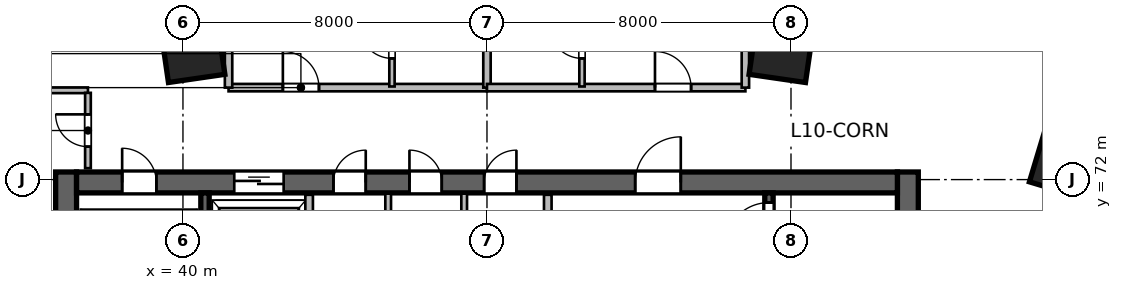
"""IFC4 building model, lengths in metres.
Left out: names, types, materials, properties, quantities, classifications, styles, units other than length and angle.
Written with IfcOpenShell. Run it as: python <this file> out.ifc"""

import sys

from ifc_helpers import new_model, si_unit, direction, frame, frame_2d, origin, origin_2d, place, context, subcontext, project, spatial, rectangle, extrude, source, transform, mapped, element, fill, save


model = new_model("IFC4")
c1 = context("Model", 3, precision=1e-05, world=origin(), true_north=direction((0.0, 1.0)))
c2 = subcontext(c1, "Body", "Model", "MODEL_VIEW")
j1 = project(units=[si_unit("LENGTHUNIT", "METRE"), si_unit("PLANEANGLEUNIT", "RADIAN")], contexts=[c1])
p1 = place(None, origin())
s1 = spatial("IfcSite", under=j1, at=p1, CompositionType="ELEMENT")
p2 = place(p1, origin())
s2 = spatial("IfcBuilding", under=s1, at=p2, CompositionType="ELEMENT")
p3 = place(p2, frame((0.0, 0.0, 49.8)))
s3 = spatial("IfcBuildingStorey", under=s2, at=p3, CompositionType="ELEMENT", Elevation=49.8)
m1 = source(origin(), c2, "Body", "SweptSolid", [
    extrude(rectangle(XDim=12.0, YDim=0.55, at=frame_2d((6.0, 0.0))), origin(), (0.0, 0.0, 1.0), 3.6),
])
for number, where, z_axis, x_axis in (
    (1, (36.925, 60.2, 0.0), (0.0, 0.0, 1.0), (0.0, 1.0, 0.0)),
    (2, (59.075, 60.2, 0.0), (0.0, 0.0, 1.0), (0.0, 1.0, 0.0)),
):
    element("IfcWall", number, at=place(p3, frame(where, z_axis=z_axis, x_axis=x_axis)), inside=s3, PredefinedType="SHEAR", context=c2, shape_type="MappedRepresentation", body=[
        mapped(m1, transform((0.0, 0.0, 0.0), scale=1.0)),
    ])
m2 = source(origin(), c2, "Body", "SweptSolid", [
    extrude(rectangle(XDim=21.6, YDim=0.55, at=frame_2d((10.8, 0.0))), origin(), (0.0, 0.0, 1.0), 3.6),
])
p4 = place(p3, frame((37.2, 71.925, 0.0), z_axis=(0.0, 0.0, 1.0), x_axis=(1.0, 0.0, 0.0)))
e3 = element("IfcWall", 3, at=p4, inside=s3, PredefinedType="SHEAR", context=c2, shape_type="MappedRepresentation", body=[
    mapped(m2, transform((0.0, 0.0, 0.0), scale=1.0)),
])
p5 = place(p4, frame((1.2, 0.0, 0.0)))
e4 = element("IfcOpeningElement", 4, at=p5, cuts=e3, PredefinedType="OPENING", context=c2, shape_type="SweptSolid", body=[
    extrude(rectangle(XDim=0.9, YDim=2.1, at=frame_2d((0.45, 1.05))), frame((0.0, 0.285, 0.0), z_axis=(0.0, -1.0, 0.0), x_axis=(1.0, 0.0, 0.0)), (0.0, 0.0, 1.0), 0.57),
])
p6 = place(p4, frame((14.7, 0.0, 0.0)))
e5 = element("IfcOpeningElement", 5, at=p6, cuts=e3, PredefinedType="OPENING", context=c2, shape_type="SweptSolid", body=[
    extrude(rectangle(XDim=1.2, YDim=2.15, at=frame_2d((0.6, 1.075))), frame((0.0, 0.285, 0.0), z_axis=(0.0, -1.0, 0.0), x_axis=(1.0, 0.0, 0.0)), (0.0, 0.0, 1.0), 0.57),
])
p7 = place(p4, frame((4.15, 0.0, 0.0)))
e6 = element("IfcOpeningElement", 6, at=p7, cuts=e3, PredefinedType="OPENING", context=c2, shape_type="SweptSolid", body=[
    extrude(rectangle(XDim=1.3, YDim=2.15, at=frame_2d((0.65, 1.075))), frame((0.0, 0.285, 0.0), z_axis=(0.0, -1.0, 0.0), x_axis=(1.0, 0.0, 0.0)), (0.0, 0.0, 1.0), 0.57),
])
p8 = place(p4, frame((6.76, 0.0, 0.0)))
e7 = element("IfcOpeningElement", 7, at=p8, cuts=e3, PredefinedType="OPENING", context=c2, shape_type="SweptSolid", body=[
    extrude(rectangle(XDim=0.85, YDim=2.1, at=frame_2d((0.425, 1.05))), frame((0.0, 0.285, 0.0), z_axis=(0.0, -1.0, 0.0), x_axis=(1.0, 0.0, 0.0)), (0.0, 0.0, 1.0), 0.57),
])
p9 = place(p4, frame((8.76, 0.0, 0.0)))
e8 = element("IfcOpeningElement", 8, at=p9, cuts=e3, PredefinedType="OPENING", context=c2, shape_type="SweptSolid", body=[
    extrude(rectangle(XDim=0.85, YDim=2.1, at=frame_2d((0.425, 1.05))), frame((0.0, 0.285, 0.0), z_axis=(0.0, -1.0, 0.0), x_axis=(1.0, 0.0, 0.0)), (0.0, 0.0, 1.0), 0.57),
])
p10 = place(p4, frame((10.725, 0.0, 0.0)))
e9 = element("IfcOpeningElement", 9, at=p10, cuts=e3, PredefinedType="OPENING", context=c2, shape_type="SweptSolid", body=[
    extrude(rectangle(XDim=0.85, YDim=2.1, at=frame_2d((0.425, 1.05))), frame((0.0, 0.285, 0.0), z_axis=(0.0, -1.0, 0.0), x_axis=(1.0, 0.0, 0.0)), (0.0, 0.0, 1.0), 0.57),
])
m3 = source(origin(), c2, "Body", "SweptSolid", [
    extrude(rectangle(XDim=10.9, YDim=0.22, at=frame_2d((5.45, 0.0))), origin(), (0.0, 0.0, 1.0), 3.6),
])
p11 = place(p3, frame((40.58, 60.75, 0.0), z_axis=(0.0, 0.0, 1.0), x_axis=(0.0, 1.0, 0.0)))
e10 = element("IfcWall", 10, at=p11, inside=s3, PredefinedType="SHEAR", context=c2, shape_type="MappedRepresentation", body=[
    mapped(m3, transform((0.0, 0.0, 0.0), scale=1.0)),
])
p12 = place(p3, frame((55.42, 60.75, 0.0), z_axis=(0.0, 0.0, 1.0), x_axis=(0.0, 1.0, 0.0)))
e11 = element("IfcWall", 11, at=p12, inside=s3, PredefinedType="SHEAR", context=c2, shape_type="MappedRepresentation", body=[
    mapped(m3, transform((0.0, 0.0, 0.0), scale=1.0)),
])
p13 = place(p12, frame((9.495, 0.0, 0.0)))
e12 = element("IfcOpeningElement", 12, at=p13, cuts=e11, PredefinedType="OPENING", context=c2, shape_type="SweptSolid", body=[
    extrude(rectangle(XDim=1.15, YDim=2.15, at=frame_2d((0.575, 1.075))), frame((0.0, 0.12, 0.0), z_axis=(0.0, -1.0, 0.0), x_axis=(1.0, 0.0, 0.0)), (0.0, 0.0, 1.0), 0.24),
])
m4 = source(origin(), c2, "Body", "SweptSolid", [
    extrude(rectangle(XDim=1.5, YDim=1.5, at=origin_2d()), origin(), (0.0, 0.0, 1.0), 3.6),
])
for number, where, z_axis, x_axis in (
    (13, (40.253, 75.404, 0.0), (0.0, 0.0, 1.0), (-0.143, 0.99, 0.0)),
    (14, (55.747, 75.404, 0.0), (0.0, 0.0, 1.0), (0.143, 0.99, 0.0)),
    (15, (63.209, 72.442, 0.0), (0.0, 0.0, 1.0), (0.289, 0.957, 0.0)),
):
    element("IfcColumn", number, at=place(p3, frame(where, z_axis=z_axis, x_axis=x_axis)), inside=s3, PredefinedType="COLUMN", context=c2, shape_type="MappedRepresentation", body=[
        mapped(m4, transform((0.0, 0.0, 0.0), scale=1.0)),
    ])
m5 = source(origin(), c2, "Body", "SweptSolid", [
    extrude(rectangle(XDim=5.8, YDim=0.2, at=frame_2d((2.9, 0.0))), origin(), (0.0, 0.0, 1.0), 3.36),
])
p14 = place(p3, frame((49.6, 65.8, 0.0), z_axis=(0.0, 0.0, 1.0), x_axis=(0.0, 1.0, 0.0)))
e16 = element("IfcWall", 16, at=p14, inside=s3, PredefinedType="SOLIDWALL", context=c2, shape_type="MappedRepresentation", body=[
    mapped(m5, transform((0.0, 0.0, 0.0), scale=1.0)),
])
m6 = source(origin(), c2, "Body", "SweptSolid", [
    extrude(rectangle(XDim=3.2, YDim=0.2, at=frame_2d((1.6, 0.0))), origin(), (0.0, 0.0, 1.0), 3.36),
])
p15 = place(p3, frame((43.32, 68.4, 0.0), z_axis=(0.0, 0.0, 1.0), x_axis=(0.0, 1.0, 0.0)))
e17 = element("IfcWall", 17, at=p15, inside=s3, PredefinedType="SOLIDWALL", context=c2, shape_type="MappedRepresentation", body=[
    mapped(m6, transform((0.0, 0.0, 0.0), scale=1.0)),
])
m7 = source(origin(), c2, "Body", "SweptSolid", [
    extrude(rectangle(XDim=3.23, YDim=0.15, at=frame_2d((1.615, 0.0))), origin(), (0.0, 0.0, 1.0), 3.36),
])
for number, where, z_axis, x_axis in (
    (18, (45.4, 68.4, 0.0), (0.0, 0.0, 1.0), (0.0, 1.0, 0.0)),
    (19, (47.4, 68.4, 0.0), (0.0, 0.0, 1.0), (0.0, 1.0, 0.0)),
):
    element("IfcWall", number, at=place(p3, frame(where, z_axis=z_axis, x_axis=x_axis)), inside=s3, PredefinedType="PARTITIONING", context=c2, shape_type="MappedRepresentation", body=[
        mapped(m7, transform((0.0, 0.0, 0.0), scale=1.0)),
    ])
m8 = source(origin(), c2, "Body", "SweptSolid", [
    extrude(rectangle(XDim=3.1, YDim=0.15, at=frame_2d((1.55, 0.0))), origin(), (0.0, 0.0, 1.0), 2.729),
])
p16 = place(p3, frame((34.4, 74.35, 0.0), z_axis=(0.0, 0.0, 1.0), x_axis=(1.0, 0.0, 0.0)))
e20 = element("IfcWall", 20, at=p16, inside=s3, PredefinedType="PARTITIONING", context=c2, shape_type="MappedRepresentation", body=[
    mapped(m8, transform((0.0, 0.0, 0.0), scale=1.0)),
])
m9 = source(origin(), c2, "Body", "SweptSolid", [
    extrude(rectangle(XDim=1.982, YDim=0.15, at=frame_2d((0.991, 0.0))), origin(), (0.0, 0.0, 1.0), 3.36),
])
p17 = place(p3, frame((37.5, 72.3, 0.0), z_axis=(0.0, 0.0, 1.0), x_axis=(0.0, 1.0, 0.0)))
e21 = element("IfcWall", 21, at=p17, inside=s3, PredefinedType="PARTITIONING", context=c2, shape_type="MappedRepresentation", body=[
    mapped(m9, transform((0.0, 0.0, 0.0), scale=1.0)),
])
p18 = place(p17, frame((0.566, 0.0, 0.0)))
e22 = element("IfcOpeningElement", 22, at=p18, cuts=e21, PredefinedType="OPENING", context=c2, shape_type="SweptSolid", body=[
    extrude(rectangle(XDim=0.85, YDim=2.1, at=frame_2d((0.425, 1.05))), frame((0.0, 0.085, 0.0), z_axis=(0.0, -1.0, 0.0), x_axis=(1.0, 0.0, 0.0)), (0.0, 0.0, 1.0), 0.17),
])
m10 = source(origin(), c2, "Body", "SweptSolid", [
    extrude(rectangle(XDim=6.8, YDim=0.195, at=frame_2d((3.4, 0.0))), origin(), (0.0, 0.0, 1.0), 3.36),
])
p19 = place(p3, frame((41.2, 74.42, 0.0), z_axis=(0.0, 0.0, 1.0), x_axis=(1.0, 0.0, 0.0)))
e23 = element("IfcWall", 23, at=p19, inside=s3, PredefinedType="PARTITIONING", context=c2, shape_type="MappedRepresentation", body=[
    mapped(m10, transform((0.0, 0.0, 0.0), scale=1.0)),
])
p20 = place(p19, frame((1.429, 0.0, 0.0)))
e24 = element("IfcOpeningElement", 24, at=p20, cuts=e23, PredefinedType="OPENING", context=c2, shape_type="SweptSolid", body=[
    extrude(rectangle(XDim=0.95, YDim=2.15, at=frame_2d((0.475, 1.075))), frame((0.0, 0.107, 0.0), z_axis=(0.0, -1.0, 0.0), x_axis=(1.0, 0.0, 0.0)), (0.0, 0.0, 1.0), 0.215),
])
m11 = source(origin(), c2, "Body", "SweptSolid", [
    extrude(rectangle(XDim=6.216, YDim=0.195, at=frame_2d((3.108, 0.0))), origin(), (0.0, 0.0, 1.0), 2.644),
])
p21 = place(p3, frame((48.0, 74.42, 0.0), z_axis=(0.0, 0.0, 1.0), x_axis=(0.0, 1.0, 0.0)))
e25 = element("IfcWall", 25, at=p21, inside=s3, PredefinedType="PARTITIONING", context=c2, shape_type="MappedRepresentation", body=[
    mapped(m11, transform((0.0, 0.0, 0.0), scale=1.0)),
])
m12 = source(origin(), c2, "Body", "SweptSolid", [
    extrude(rectangle(XDim=5.426, YDim=0.195, at=frame_2d((2.713, 0.0))), origin(), (0.0, 0.0, 1.0), 3.36),
])
p22 = place(p3, frame((41.2, 74.42, 0.0), z_axis=(0.0, 0.0, 1.0), x_axis=(0.0, 1.0, 0.0)))
e26 = element("IfcWall", 26, at=p22, inside=s3, PredefinedType="PARTITIONING", context=c2, shape_type="MappedRepresentation", body=[
    mapped(m12, transform((0.0, 0.0, 0.0), scale=1.0)),
])
m13 = source(origin(), c2, "Body", "SweptSolid", [
    extrude(rectangle(XDim=2.33, YDim=0.14, at=frame_2d((1.165, 0.0))), origin(), (0.0, 0.0, 1.0), 3.36),
])
p23 = place(p3, frame((45.5, 74.45, 0.0), z_axis=(0.0, 0.0, 1.0), x_axis=(0.0, 1.0, 0.0)))
e27 = element("IfcWall", 27, at=p23, inside=s3, PredefinedType="PARTITIONING", context=c2, shape_type="MappedRepresentation", body=[
    mapped(m13, transform((0.0, 0.0, 0.0), scale=1.0)),
])
p24 = place(p23, frame((0.74, 0.0, 0.0)))
e28 = element("IfcOpeningElement", 28, at=p24, cuts=e27, PredefinedType="OPENING", context=c2, shape_type="SweptSolid", body=[
    extrude(rectangle(XDim=0.85, YDim=2.05, at=frame_2d((0.425, 1.025))), frame((0.0, 0.08, 0.0), z_axis=(0.0, -1.0, 0.0), x_axis=(1.0, 0.0, 0.0)), (0.0, 0.0, 1.0), 0.16),
])
p25 = place(p3, frame((48.0, 74.42, 0.0), z_axis=(0.0, 0.0, 1.0), x_axis=(1.0, 0.0, 0.0)))
e29 = element("IfcWall", 29, at=p25, inside=s3, PredefinedType="PARTITIONING", context=c2, shape_type="MappedRepresentation", body=[
    mapped(m10, transform((0.0, 0.0, 0.0), scale=1.0)),
])
p26 = place(p25, frame((4.421, 0.0, 0.0)))
e30 = element("IfcOpeningElement", 30, at=p26, cuts=e29, PredefinedType="OPENING", context=c2, shape_type="SweptSolid", body=[
    extrude(rectangle(XDim=0.95, YDim=2.15, at=frame_2d((0.475, 1.075))), frame((0.0, 0.107, 0.0), z_axis=(0.0, -1.0, 0.0), x_axis=(1.0, 0.0, 0.0)), (0.0, 0.0, 1.0), 0.215),
])
p27 = place(p3, frame((54.8, 74.42, 0.0), z_axis=(0.0, 0.0, 1.0), x_axis=(0.0, 1.0, 0.0)))
e31 = element("IfcWall", 31, at=p27, inside=s3, PredefinedType="PARTITIONING", context=c2, shape_type="MappedRepresentation", body=[
    mapped(m12, transform((0.0, 0.0, 0.0), scale=1.0)),
])
p28 = place(p3, frame((50.5, 74.45, 0.0), z_axis=(0.0, 0.0, 1.0), x_axis=(0.0, 1.0, 0.0)))
e32 = element("IfcWall", 32, at=p28, inside=s3, PredefinedType="PARTITIONING", context=c2, shape_type="MappedRepresentation", body=[
    mapped(m13, transform((0.0, 0.0, 0.0), scale=1.0)),
])
p29 = place(p28, frame((0.74, 0.0, 0.0)))
e33 = element("IfcOpeningElement", 33, at=p29, cuts=e32, PredefinedType="OPENING", context=c2, shape_type="SweptSolid", body=[
    extrude(rectangle(XDim=0.85, YDim=2.05, at=frame_2d((0.425, 1.025))), frame((0.0, 0.08, 0.0), z_axis=(0.0, -1.0, 0.0), x_axis=(1.0, 0.0, 0.0)), (0.0, 0.0, 1.0), 0.16),
])
m14 = source(origin(), c2, "Body", "SweptSolid", [
    extrude(rectangle(XDim=0.9, YDim=2.1, at=frame_2d((0.45, 1.05))), frame((0.0, 0.025, 0.0), z_axis=(0.0, -1.0, 0.0), x_axis=(1.0, 0.0, 0.0)), (0.0, 0.0, 1.0), 0.05),
])
p30 = place(p5, origin())
e34 = element("IfcDoor", 34, at=p30, inside=s3, OperationType="SINGLE_SWING_LEFT", PredefinedType="DOOR", context=c2, shape_type="MappedRepresentation", body=[
    mapped(m14, transform((0.0, 0.0, 0.0), scale=1.0)),
])
fill(e4, e34)
m15 = source(origin(), c2, "Body", "SweptSolid", [
    extrude(rectangle(XDim=1.15, YDim=2.15, at=frame_2d((0.575, 1.075))), frame((0.0, 0.025, 0.0), z_axis=(0.0, -1.0, 0.0), x_axis=(1.0, 0.0, 0.0)), (0.0, 0.0, 1.0), 0.05),
])
p31 = place(p13, origin())
e35 = element("IfcDoor", 35, at=p31, inside=s3, OperationType="SINGLE_SWING_LEFT", PredefinedType="DOOR", context=c2, shape_type="MappedRepresentation", body=[
    mapped(m15, transform((0.0, 0.0, 0.0), scale=1.0)),
])
fill(e12, e35)
m16 = source(origin(), c2, "Body", "SweptSolid", [
    extrude(rectangle(XDim=1.2, YDim=2.15, at=frame_2d((0.6, 1.075))), frame((0.0, 0.025, 0.0), z_axis=(0.0, -1.0, 0.0), x_axis=(1.0, 0.0, 0.0)), (0.0, 0.0, 1.0), 0.05),
])
p32 = place(p6, origin())
e36 = element("IfcDoor", 36, at=p32, inside=s3, OperationType="SINGLE_SWING_RIGHT", PredefinedType="DOOR", context=c2, shape_type="MappedRepresentation", body=[
    mapped(m16, transform((0.0, 0.0, 0.0), scale=1.0)),
])
fill(e5, e36)
m17 = source(origin(), c2, "Body", "SweptSolid", [
    extrude(rectangle(XDim=1.3, YDim=2.15, at=frame_2d((0.65, 1.075))), frame((0.0, 0.025, 0.0), z_axis=(0.0, -1.0, 0.0), x_axis=(1.0, 0.0, 0.0)), (0.0, 0.0, 1.0), 0.05),
])
p33 = place(p7, origin())
e37 = element("IfcDoor", 37, at=p33, inside=s3, OperationType="DOUBLE_DOOR_SLIDING", PredefinedType="DOOR", context=c2, shape_type="MappedRepresentation", body=[
    mapped(m17, transform((0.0, 0.0, 0.0), scale=1.0)),
])
fill(e6, e37)
m18 = source(origin(), c2, "Body", "SweptSolid", [
    extrude(rectangle(XDim=0.85, YDim=2.1, at=frame_2d((0.425, 1.05))), frame((0.0, 0.025, 0.0), z_axis=(0.0, -1.0, 0.0), x_axis=(1.0, 0.0, 0.0)), (0.0, 0.0, 1.0), 0.05),
])
p34 = place(p8, origin())
e38 = element("IfcDoor", 38, at=p34, inside=s3, OperationType="SINGLE_SWING_RIGHT", PredefinedType="DOOR", context=c2, shape_type="MappedRepresentation", body=[
    mapped(m18, transform((0.0, 0.0, 0.0), scale=1.0)),
])
fill(e7, e38)
p35 = place(p9, origin())
e39 = element("IfcDoor", 39, at=p35, inside=s3, OperationType="SINGLE_SWING_LEFT", PredefinedType="DOOR", context=c2, shape_type="MappedRepresentation", body=[
    mapped(m18, transform((0.0, 0.0, 0.0), scale=1.0)),
])
fill(e8, e39)
p36 = place(p10, origin())
e40 = element("IfcDoor", 40, at=p36, inside=s3, OperationType="SINGLE_SWING_RIGHT", PredefinedType="DOOR", context=c2, shape_type="MappedRepresentation", body=[
    mapped(m18, transform((0.0, 0.0, 0.0), scale=1.0)),
])
fill(e9, e40)
p37 = place(p18, origin())
e41 = element("IfcDoor", 41, at=p37, inside=s3, OperationType="SINGLE_SWING_RIGHT", PredefinedType="DOOR", context=c2, shape_type="MappedRepresentation", body=[
    mapped(m18, transform((0.0, 0.0, 0.0), scale=1.0)),
])
fill(e22, e41)
m19 = source(origin(), c2, "Body", "SweptSolid", [
    extrude(rectangle(XDim=0.95, YDim=2.15, at=frame_2d((0.475, 1.075))), frame((0.0, 0.025, 0.0), z_axis=(0.0, -1.0, 0.0), x_axis=(1.0, 0.0, 0.0)), (0.0, 0.0, 1.0), 0.05),
])
p38 = place(p20, origin())
e42 = element("IfcDoor", 42, at=p38, inside=s3, OperationType="SINGLE_SWING_LEFT", PredefinedType="DOOR", context=c2, shape_type="MappedRepresentation", body=[
    mapped(m19, transform((0.0, 0.0, 0.0), scale=1.0)),
])
fill(e24, e42)
m20 = source(origin(), c2, "Body", "SweptSolid", [
    extrude(rectangle(XDim=0.85, YDim=2.05, at=frame_2d((0.425, 1.025))), frame((0.0, 0.025, 0.0), z_axis=(0.0, -1.0, 0.0), x_axis=(1.0, 0.0, 0.0)), (0.0, 0.0, 1.0), 0.05),
])
p39 = place(p24, origin())
e43 = element("IfcDoor", 43, at=p39, inside=s3, OperationType="SINGLE_SWING_RIGHT", PredefinedType="DOOR", context=c2, shape_type="MappedRepresentation", body=[
    mapped(m20, transform((0.0, 0.0, 0.0), scale=1.0)),
])
fill(e28, e43)
p40 = place(p26, origin())
e44 = element("IfcDoor", 44, at=p40, inside=s3, OperationType="SINGLE_SWING_LEFT", PredefinedType="DOOR", context=c2, shape_type="MappedRepresentation", body=[
    mapped(m19, transform((0.0, 0.0, 0.0), scale=1.0)),
])
fill(e30, e44)
p41 = place(p29, origin())
e45 = element("IfcDoor", 45, at=p41, inside=s3, OperationType="SINGLE_SWING_RIGHT", PredefinedType="DOOR", context=c2, shape_type="MappedRepresentation", body=[
    mapped(m20, transform((0.0, 0.0, 0.0), scale=1.0)),
])
fill(e33, e45)
save(model, sys.argv[1])
